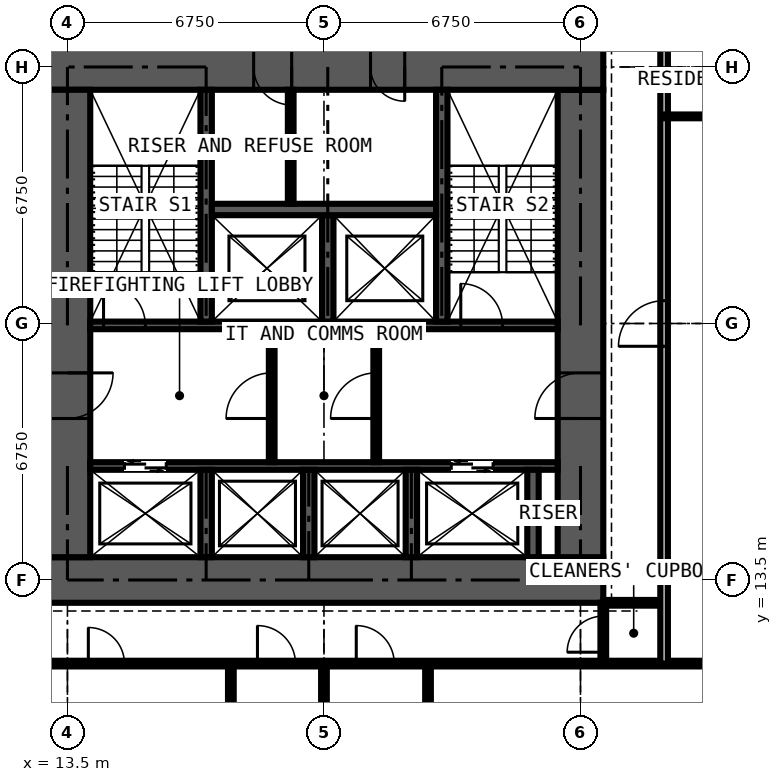
"""IFC4 building model, lengths in metres.
Left out: names, types, materials, properties, quantities, classifications, styles, units other than length and angle.
Written with IfcOpenShell. Run it as: python <this file> out.ifc"""

import sys

from ifc_helpers import new_model, si_unit, direction, frame, frame_2d, origin, place, context, subcontext, project, spatial, rectangle, extrude, element, fill, save


model = new_model("IFC4")
c1 = context("Model", 3, precision=1e-05, world=origin(), true_north=direction((0.0, 1.0)))
c2 = subcontext(c1, "Body", "Model", "MODEL_VIEW")
j1 = project(units=[si_unit("LENGTHUNIT", "METRE"), si_unit("PLANEANGLEUNIT", "RADIAN")], contexts=[c1])
p1 = place(None, origin())
s1 = spatial("IfcSite", under=j1, at=p1, CompositionType="ELEMENT")
p2 = place(p1, origin())
s2 = spatial("IfcBuilding", under=s1, at=p2, CompositionType="ELEMENT")
p3 = place(p2, frame((0.0, 0.0, 64.8)))
s3 = spatial("IfcBuildingStorey", under=s2, at=p3, CompositionType="ELEMENT", Elevation=64.8)
p4 = place(p3, frame((12.9, 13.5, 0.0), z_axis=(0.0, 0.0, 1.0), x_axis=(1.0, 0.0, 0.0)))
e1 = element("IfcWall", 1, at=p4, inside=s3, PredefinedType="SHEAR", context=c2, shape_type="SweptSolid", body=[
    extrude(rectangle(XDim=14.7, YDim=1.2, at=frame_2d((7.35, 0.0))), origin(), (0.0, 0.0, 1.0), 3.6),
])
p5 = place(p3, frame((27.0, 14.1, 0.0), z_axis=(0.0, 0.0, 1.0), x_axis=(0.0, 1.0, 0.0)))
e2 = element("IfcWall", 2, at=p5, inside=s3, PredefinedType="SHEAR", context=c2, shape_type="SweptSolid", body=[
    extrude(rectangle(XDim=12.3, YDim=1.2, at=frame_2d((6.15, 0.0))), origin(), (0.0, 0.0, 1.0), 3.6),
])
p6 = place(p5, frame((3.65, 0.0, 0.0)))
e3 = element("IfcOpeningElement", 3, at=p6, cuts=e2, PredefinedType="OPENING", context=c2, shape_type="SweptSolid", body=[
    extrude(rectangle(XDim=1.2, YDim=2.2, at=frame_2d((0.6, 1.1))), frame((0.0, 0.61, 0.0), z_axis=(0.0, -1.0, 0.0), x_axis=(1.0, 0.0, 0.0)), (0.0, 0.0, 1.0), 1.22),
])
p7 = place(p3, frame((27.6, 27.0, 0.0), z_axis=(0.0, 0.0, 1.0), x_axis=(-1.0, 0.0, 0.0)))
e4 = element("IfcWall", 4, at=p7, inside=s3, PredefinedType="SHEAR", context=c2, shape_type="SweptSolid", body=[
    extrude(rectangle(XDim=14.7, YDim=1.2, at=frame_2d((7.35, 0.0))), origin(), (0.0, 0.0, 1.0), 3.6),
])
p8 = place(p7, frame((5.225, 0.0, 0.0)))
e5 = element("IfcOpeningElement", 5, at=p8, cuts=e4, PredefinedType="OPENING", context=c2, shape_type="SweptSolid", body=[
    extrude(rectangle(XDim=0.9, YDim=2.2, at=frame_2d((0.45, 1.1))), frame((0.0, 0.61, 0.0), z_axis=(0.0, -1.0, 0.0), x_axis=(1.0, 0.0, 0.0)), (0.0, 0.0, 1.0), 1.22),
])
p9 = place(p7, frame((8.2, 0.0, 0.0)))
e6 = element("IfcOpeningElement", 6, at=p9, cuts=e4, PredefinedType="OPENING", context=c2, shape_type="SweptSolid", body=[
    extrude(rectangle(XDim=1.0, YDim=2.2, at=frame_2d((0.5, 1.1))), frame((0.0, 0.61, 0.0), z_axis=(0.0, -1.0, 0.0), x_axis=(1.0, 0.0, 0.0)), (0.0, 0.0, 1.0), 1.22),
])
p10 = place(p3, frame((13.5, 26.4, 0.0), z_axis=(0.0, 0.0, 1.0), x_axis=(0.0, -1.0, 0.0)))
e7 = element("IfcWall", 7, at=p10, inside=s3, PredefinedType="SHEAR", context=c2, shape_type="SweptSolid", body=[
    extrude(rectangle(XDim=12.3, YDim=1.2, at=frame_2d((6.15, 0.0))), origin(), (0.0, 0.0, 1.0), 3.6),
])
p11 = place(p10, frame((7.45, 0.0, 0.0)))
e8 = element("IfcOpeningElement", 8, at=p11, cuts=e7, PredefinedType="OPENING", context=c2, shape_type="SweptSolid", body=[
    extrude(rectangle(XDim=1.2, YDim=2.2, at=frame_2d((0.6, 1.1))), frame((0.0, 0.61, 0.0), z_axis=(0.0, -1.0, 0.0), x_axis=(1.0, 0.0, 0.0)), (0.0, 0.0, 1.0), 1.22),
])
p12 = place(p3, frame((14.1, 16.5, 0.0), z_axis=(0.0, 0.0, 1.0), x_axis=(1.0, 0.0, 0.0)))
e9 = element("IfcWall", 9, at=p12, inside=s3, PredefinedType="SHEAR", context=c2, shape_type="SweptSolid", body=[
    extrude(rectangle(XDim=12.3, YDim=0.2, at=frame_2d((6.15, 0.0))), origin(), (0.0, 0.0, 1.0), 3.6),
])
p13 = place(p12, frame((0.9, 0.0, 0.0)))
e10 = element("IfcOpeningElement", 10, at=p13, cuts=e9, PredefinedType="OPENING", context=c2, shape_type="SweptSolid", body=[
    extrude(rectangle(XDim=1.1, YDim=2.2, at=frame_2d((0.55, 1.1))), frame((0.0, 0.11, 0.0), z_axis=(0.0, -1.0, 0.0), x_axis=(1.0, 0.0, 0.0)), (0.0, 0.0, 1.0), 0.22),
])
p14 = place(p12, frame((9.5, 0.0, 0.0)))
e11 = element("IfcOpeningElement", 11, at=p14, cuts=e9, PredefinedType="OPENING", context=c2, shape_type="SweptSolid", body=[
    extrude(rectangle(XDim=1.1, YDim=2.2, at=frame_2d((0.55, 1.1))), frame((0.0, 0.11, 0.0), z_axis=(0.0, -1.0, 0.0), x_axis=(1.0, 0.0, 0.0)), (0.0, 0.0, 1.0), 0.22),
])
p15 = place(p3, frame((14.1, 20.2, 0.0), z_axis=(0.0, 0.0, 1.0), x_axis=(1.0, 0.0, 0.0)))
e12 = element("IfcWall", 12, at=p15, inside=s3, PredefinedType="SHEAR", context=c2, shape_type="SweptSolid", body=[
    extrude(rectangle(XDim=12.3, YDim=0.2, at=frame_2d((6.15, 0.0))), origin(), (0.0, 0.0, 1.0), 3.6),
])
p16 = place(p15, frame((0.35, 0.0, 0.0)))
e13 = element("IfcOpeningElement", 13, at=p16, cuts=e12, PredefinedType="OPENING", context=c2, shape_type="SweptSolid", body=[
    extrude(rectangle(XDim=1.1, YDim=2.2, at=frame_2d((0.55, 1.1))), frame((0.0, 0.11, 0.0), z_axis=(0.0, -1.0, 0.0), x_axis=(1.0, 0.0, 0.0)), (0.0, 0.0, 1.0), 0.22),
])
p17 = place(p15, frame((9.75, 0.0, 0.0)))
e14 = element("IfcOpeningElement", 14, at=p17, cuts=e12, PredefinedType="OPENING", context=c2, shape_type="SweptSolid", body=[
    extrude(rectangle(XDim=1.1, YDim=2.2, at=frame_2d((0.55, 1.1))), frame((0.0, 0.11, 0.0), z_axis=(0.0, -1.0, 0.0), x_axis=(1.0, 0.0, 0.0)), (0.0, 0.0, 1.0), 0.22),
])
for number, where, z_axis, x_axis in (
    (15, (17.15, 20.3, 0.0), (0.0, 0.0, 1.0), (0.0, 1.0, 0.0)),
    (16, (23.35, 20.3, 0.0), (0.0, 0.0, 1.0), (0.0, 1.0, 0.0)),
):
    element("IfcWall", number, at=place(p3, frame(where, z_axis=z_axis, x_axis=x_axis)), inside=s3, PredefinedType="SHEAR", context=c2, shape_type="SweptSolid", body=[
        extrude(rectangle(XDim=6.1, YDim=0.3, at=frame_2d((3.05, 0.0))), origin(), (0.0, 0.0, 1.0), 3.6),
    ])
p18 = place(p3, frame((20.35, 20.3, 0.0), z_axis=(0.0, 0.0, 1.0), x_axis=(0.0, 1.0, 0.0)))
e17 = element("IfcWall", 17, at=p18, inside=s3, PredefinedType="SHEAR", context=c2, shape_type="SweptSolid", body=[
    extrude(rectangle(XDim=2.8, YDim=0.3, at=frame_2d((1.4, 0.0))), origin(), (0.0, 0.0, 1.0), 3.6),
])
p19 = place(p3, frame((17.3, 23.25, 0.0), z_axis=(0.0, 0.0, 1.0), x_axis=(1.0, 0.0, 0.0)))
e18 = element("IfcWall", 18, at=p19, inside=s3, PredefinedType="SHEAR", context=c2, shape_type="SweptSolid", body=[
    extrude(rectangle(XDim=5.9, YDim=0.3, at=frame_2d((2.95, 0.0))), origin(), (0.0, 0.0, 1.0), 3.6),
])
for number, where, z_axis, x_axis in (
    (19, (17.15, 14.1, 0.0), (0.0, 0.0, 1.0), (0.0, 1.0, 0.0)),
    (20, (19.85, 14.1, 0.0), (0.0, 0.0, 1.0), (0.0, 1.0, 0.0)),
    (21, (22.55, 14.1, 0.0), (0.0, 0.0, 1.0), (0.0, 1.0, 0.0)),
    (22, (25.75, 14.1, 0.0), (0.0, 0.0, 1.0), (0.0, 1.0, 0.0)),
):
    element("IfcWall", number, at=place(p3, frame(where, z_axis=z_axis, x_axis=x_axis)), inside=s3, PredefinedType="SHEAR", context=c2, shape_type="SweptSolid", body=[
        extrude(rectangle(XDim=2.3, YDim=0.3, at=frame_2d((1.15, 0.0))), origin(), (0.0, 0.0, 1.0), 3.6),
    ])
p20 = place(p3, frame((18.875, 16.6, 0.0), z_axis=(0.0, 0.0, 1.0), x_axis=(0.0, 1.0, 0.0)))
e23 = element("IfcWall", 23, at=p20, inside=s3, PredefinedType="PARTITIONING", context=c2, shape_type="SweptSolid", body=[
    extrude(rectangle(XDim=3.5, YDim=0.15, at=frame_2d((1.75, 0.0))), origin(), (0.0, 0.0, 1.0), 3.375),
])
p21 = place(p20, frame((1.15, 0.0, 0.0)))
e24 = element("IfcOpeningElement", 24, at=p21, cuts=e23, PredefinedType="OPENING", context=c2, shape_type="SweptSolid", body=[
    extrude(rectangle(XDim=1.2, YDim=2.2, at=frame_2d((0.6, 1.1))), frame((0.0, 0.085, 0.0), z_axis=(0.0, -1.0, 0.0), x_axis=(1.0, 0.0, 0.0)), (0.0, 0.0, 1.0), 0.17),
])
p22 = place(p3, frame((21.625, 16.6, 0.0), z_axis=(0.0, 0.0, 1.0), x_axis=(0.0, 1.0, 0.0)))
e25 = element("IfcWall", 25, at=p22, inside=s3, PredefinedType="PARTITIONING", context=c2, shape_type="SweptSolid", body=[
    extrude(rectangle(XDim=3.5, YDim=0.15, at=frame_2d((1.75, 0.0))), origin(), (0.0, 0.0, 1.0), 3.375),
])
p23 = place(p22, frame((1.15, 0.0, 0.0)))
e26 = element("IfcOpeningElement", 26, at=p23, cuts=e25, PredefinedType="OPENING", context=c2, shape_type="SweptSolid", body=[
    extrude(rectangle(XDim=1.2, YDim=2.2, at=frame_2d((0.6, 1.1))), frame((0.0, 0.085, 0.0), z_axis=(0.0, -1.0, 0.0), x_axis=(1.0, 0.0, 0.0)), (0.0, 0.0, 1.0), 0.17),
])
p24 = place(p3, frame((19.375, 23.4, 0.0), z_axis=(0.0, 0.0, 1.0), x_axis=(0.0, 1.0, 0.0)))
e27 = element("IfcWall", 27, at=p24, inside=s3, PredefinedType="PARTITIONING", context=c2, shape_type="SweptSolid", body=[
    extrude(rectangle(XDim=3.0, YDim=0.15, at=frame_2d((1.5, 0.0))), origin(), (0.0, 0.0, 1.0), 3.375),
])
p25 = place(p3, frame((10.125, 11.3, 0.0), z_axis=(0.0, 0.0, 1.0), x_axis=(1.0, 0.0, 0.0)))
e28 = element("IfcWall", 28, at=p25, inside=s3, PredefinedType="PARTITIONING", context=c2, shape_type="SweptSolid", body=[
    extrude(rectangle(XDim=20.675, YDim=0.15, at=frame_2d((10.337, 0.0))), origin(), (0.0, 0.0, 1.0), 3.375),
])
p26 = place(p25, frame((8.375, 0.0, 0.0)))
e29 = element("IfcOpeningElement", 29, at=p26, cuts=e28, PredefinedType="OPENING", context=c2, shape_type="SweptSolid", body=[
    extrude(rectangle(XDim=1.0, YDim=2.2, at=frame_2d((0.5, 1.1))), frame((0.0, 0.085, 0.0), z_axis=(0.0, -1.0, 0.0), x_axis=(1.0, 0.0, 0.0)), (0.0, 0.0, 1.0), 0.17),
])
p27 = place(p25, frame((10.975, 0.0, 0.0)))
e30 = element("IfcOpeningElement", 30, at=p27, cuts=e28, PredefinedType="OPENING", context=c2, shape_type="SweptSolid", body=[
    extrude(rectangle(XDim=1.0, YDim=2.2, at=frame_2d((0.5, 1.1))), frame((0.0, 0.085, 0.0), z_axis=(0.0, -1.0, 0.0), x_axis=(1.0, 0.0, 0.0)), (0.0, 0.0, 1.0), 0.17),
])
p28 = place(p25, frame((3.925, 0.0, 0.0)))
e31 = element("IfcOpeningElement", 31, at=p28, cuts=e28, PredefinedType="OPENING", context=c2, shape_type="SweptSolid", body=[
    extrude(rectangle(XDim=0.95, YDim=2.2, at=frame_2d((0.475, 1.1))), frame((0.0, 0.085, 0.0), z_axis=(0.0, -1.0, 0.0), x_axis=(1.0, 0.0, 0.0)), (0.0, 0.0, 1.0), 0.17),
])
p29 = place(p3, frame((17.8, 5.65, 0.0), z_axis=(0.0, 0.0, 1.0), x_axis=(0.0, 1.0, 0.0)))
e32 = element("IfcWall", 32, at=p29, inside=s3, PredefinedType="PARTITIONING", context=c2, shape_type="SweptSolid", body=[
    extrude(rectangle(XDim=5.65, YDim=0.15, at=frame_2d((2.825, 0.0))), origin(), (0.0, 0.0, 1.0), 3.375),
])
p30 = place(p3, frame((20.25, -0.734, 0.0), z_axis=(0.0, 0.0, 1.0), x_axis=(0.0, 1.0, 0.0)))
e33 = element("IfcWall", 33, at=p30, inside=s3, PredefinedType="PARTITIONING", context=c2, shape_type="SweptSolid", body=[
    extrude(rectangle(XDim=12.034, YDim=0.15, at=frame_2d((6.017, 0.0))), origin(), (0.0, 0.0, 1.0), 2.61),
])
p31 = place(p3, frame((22.988, 5.65, 0.0), z_axis=(0.0, 0.0, 1.0), x_axis=(0.0, 1.0, 0.0)))
e34 = element("IfcWall", 34, at=p31, inside=s3, PredefinedType="PARTITIONING", context=c2, shape_type="SweptSolid", body=[
    extrude(rectangle(XDim=5.65, YDim=0.15, at=frame_2d((2.825, 0.0))), origin(), (0.0, 0.0, 1.0), 3.375),
])
p32 = place(p3, frame((27.6, 11.3, 0.0), z_axis=(0.0, 0.0, 1.0), x_axis=(0.0, 1.0, 0.0)))
e35 = element("IfcWall", 35, at=p32, inside=s3, PredefinedType="PARTITIONING", context=c2, shape_type="SweptSolid", body=[
    extrude(rectangle(XDim=1.6, YDim=0.15, at=frame_2d((0.8, 0.0))), origin(), (0.0, 0.0, 1.0), 3.375),
])
p33 = place(p32, frame((0.3, 0.0, 0.0)))
e36 = element("IfcOpeningElement", 36, at=p33, cuts=e35, PredefinedType="OPENING", context=c2, shape_type="SweptSolid", body=[
    extrude(rectangle(XDim=0.95, YDim=2.2, at=frame_2d((0.475, 1.1))), frame((0.0, 0.085, 0.0), z_axis=(0.0, -1.0, 0.0), x_axis=(1.0, 0.0, 0.0)), (0.0, 0.0, 1.0), 0.17),
])
p34 = place(p3, frame((27.6, 12.9, 0.0), z_axis=(0.0, 0.0, 1.0), x_axis=(1.0, 0.0, 0.0)))
e37 = element("IfcWall", 37, at=p34, inside=s3, PredefinedType="PARTITIONING", context=c2, shape_type="SweptSolid", body=[
    extrude(rectangle(XDim=1.6, YDim=0.15, at=frame_2d((0.8, 0.0))), origin(), (0.0, 0.0, 1.0), 2.877),
])
p35 = place(p3, frame((29.2, 11.3, 0.0), z_axis=(0.0, 0.0, 1.0), x_axis=(0.0, 1.0, 0.0)))
e38 = element("IfcWall", 38, at=p35, inside=s3, PredefinedType="PARTITIONING", context=c2, shape_type="SweptSolid", body=[
    extrude(rectangle(XDim=17.9, YDim=0.2, at=frame_2d((8.95, 0.0))), origin(), (0.0, 0.0, 1.0), 3.375),
])
p36 = place(p35, frame((8.35, 0.0, 0.0)))
e39 = element("IfcOpeningElement", 39, at=p36, cuts=e38, PredefinedType="OPENING", context=c2, shape_type="SweptSolid", body=[
    extrude(rectangle(XDim=1.2, YDim=2.2, at=frame_2d((0.6, 1.1))), frame((0.0, 0.11, 0.0), z_axis=(0.0, -1.0, 0.0), x_axis=(1.0, 0.0, 0.0)), (0.0, 0.0, 1.0), 0.22),
])
p37 = place(p3, frame((29.2, 25.7, 0.0), z_axis=(0.0, 0.0, 1.0), x_axis=(1.0, 0.0, 0.0)))
e40 = element("IfcWall", 40, at=p37, inside=s3, PredefinedType="SHEAR", context=c2, shape_type="SweptSolid", body=[
    extrude(rectangle(XDim=3.45, YDim=0.1, at=frame_2d((1.725, 0.0))), origin(), (0.0, 0.0, 1.0), 3.375),
])
p38 = place(p13, origin())
e41 = element("IfcDoor", 41, at=p38, inside=s3, OperationType="DOUBLE_DOOR_SLIDING", PredefinedType="DOOR", context=c2, shape_type="SweptSolid", body=[
    extrude(rectangle(XDim=1.1, YDim=2.2, at=frame_2d((0.55, 1.1))), frame((0.0, 0.025, 0.0), z_axis=(0.0, -1.0, 0.0), x_axis=(1.0, 0.0, 0.0)), (0.0, 0.0, 1.0), 0.05),
])
fill(e10, e41)
p39 = place(p14, origin())
e42 = element("IfcDoor", 42, at=p39, inside=s3, OperationType="DOUBLE_DOOR_SLIDING", PredefinedType="DOOR", context=c2, shape_type="SweptSolid", body=[
    extrude(rectangle(XDim=1.1, YDim=2.2, at=frame_2d((0.55, 1.1))), frame((0.0, 0.025, 0.0), z_axis=(0.0, -1.0, 0.0), x_axis=(1.0, 0.0, 0.0)), (0.0, 0.0, 1.0), 0.05),
])
fill(e11, e42)
p40 = place(p11, origin())
e43 = element("IfcDoor", 43, at=p40, inside=s3, OperationType="DOUBLE_DOOR_SINGLE_SWING", PredefinedType="DOOR", context=c2, shape_type="SweptSolid", body=[
    extrude(rectangle(XDim=1.2, YDim=2.2, at=frame_2d((0.6, 1.1))), frame((0.0, 0.025, 0.0), z_axis=(0.0, -1.0, 0.0), x_axis=(1.0, 0.0, 0.0)), (0.0, 0.0, 1.0), 0.05),
])
fill(e8, e43)
p41 = place(p6, origin())
e44 = element("IfcDoor", 44, at=p41, inside=s3, OperationType="DOUBLE_DOOR_SINGLE_SWING", PredefinedType="DOOR", context=c2, shape_type="SweptSolid", body=[
    extrude(rectangle(XDim=1.2, YDim=2.2, at=frame_2d((0.6, 1.1))), frame((0.0, 0.025, 0.0), z_axis=(0.0, -1.0, 0.0), x_axis=(1.0, 0.0, 0.0)), (0.0, 0.0, 1.0), 0.05),
])
fill(e3, e44)
p42 = place(p21, origin())
e45 = element("IfcDoor", 45, at=p42, inside=s3, OperationType="DOUBLE_DOOR_SINGLE_SWING", PredefinedType="DOOR", context=c2, shape_type="SweptSolid", body=[
    extrude(rectangle(XDim=1.2, YDim=2.2, at=frame_2d((0.6, 1.1))), frame((0.0, 0.025, 0.0), z_axis=(0.0, -1.0, 0.0), x_axis=(1.0, 0.0, 0.0)), (0.0, 0.0, 1.0), 0.05),
])
fill(e24, e45)
p43 = place(p23, origin())
e46 = element("IfcDoor", 46, at=p43, inside=s3, OperationType="DOUBLE_DOOR_SINGLE_SWING", PredefinedType="DOOR", context=c2, shape_type="SweptSolid", body=[
    extrude(rectangle(XDim=1.2, YDim=2.2, at=frame_2d((0.6, 1.1))), frame((0.0, 0.025, 0.0), z_axis=(0.0, -1.0, 0.0), x_axis=(1.0, 0.0, 0.0)), (0.0, 0.0, 1.0), 0.05),
])
fill(e26, e46)
p44 = place(p8, origin())
e47 = element("IfcDoor", 47, at=p44, inside=s3, OperationType="SINGLE_SWING_LEFT", PredefinedType="DOOR", context=c2, shape_type="SweptSolid", body=[
    extrude(rectangle(XDim=0.9, YDim=2.2, at=frame_2d((0.45, 1.1))), frame((0.0, 0.4, 0.0), z_axis=(0.0, -1.0, 0.0), x_axis=(1.0, 0.0, 0.0)), (0.0, 0.0, 1.0), 0.8),
])
fill(e5, e47)
p45 = place(p9, origin())
e48 = element("IfcDoor", 48, at=p45, inside=s3, OperationType="SINGLE_SWING_LEFT", PredefinedType="DOOR", context=c2, shape_type="SweptSolid", body=[
    extrude(rectangle(XDim=1.0, YDim=2.2, at=frame_2d((0.5, 1.1))), frame((0.0, 0.025, 0.0), z_axis=(0.0, -1.0, 0.0), x_axis=(1.0, 0.0, 0.0)), (0.0, 0.0, 1.0), 0.05),
])
fill(e6, e48)
p46 = place(p16, origin())
e49 = element("IfcDoor", 49, at=p46, inside=s3, OperationType="SINGLE_SWING_LEFT", PredefinedType="DOOR", context=c2, shape_type="SweptSolid", body=[
    extrude(rectangle(XDim=1.1, YDim=2.2, at=frame_2d((0.55, 1.1))), frame((0.0, 0.025, 0.0), z_axis=(0.0, -1.0, 0.0), x_axis=(1.0, 0.0, 0.0)), (0.0, 0.0, 1.0), 0.05),
])
fill(e13, e49)
p47 = place(p17, origin())
e50 = element("IfcDoor", 50, at=p47, inside=s3, OperationType="SINGLE_SWING_LEFT", PredefinedType="DOOR", context=c2, shape_type="SweptSolid", body=[
    extrude(rectangle(XDim=1.1, YDim=2.2, at=frame_2d((0.55, 1.1))), frame((0.0, 0.025, 0.0), z_axis=(0.0, -1.0, 0.0), x_axis=(1.0, 0.0, 0.0)), (0.0, 0.0, 1.0), 0.05),
])
fill(e14, e50)
p48 = place(p33, origin())
e51 = element("IfcDoor", 51, at=p48, inside=s3, OperationType="SINGLE_SWING_LEFT", PredefinedType="DOOR", context=c2, shape_type="SweptSolid", body=[
    extrude(rectangle(XDim=0.95, YDim=2.2, at=frame_2d((0.475, 1.1))), frame((0.0, 0.025, 0.0), z_axis=(0.0, -1.0, 0.0), x_axis=(1.0, 0.0, 0.0)), (0.0, 0.0, 1.0), 0.05),
])
fill(e36, e51)
p49 = place(p26, origin())
e52 = element("IfcDoor", 52, at=p49, inside=s3, OperationType="SINGLE_SWING_LEFT", PredefinedType="DOOR", context=c2, shape_type="SweptSolid", body=[
    extrude(rectangle(XDim=1.0, YDim=2.2, at=frame_2d((0.5, 1.1))), frame((0.0, 0.025, 0.0), z_axis=(0.0, -1.0, 0.0), x_axis=(1.0, 0.0, 0.0)), (0.0, 0.0, 1.0), 0.05),
])
fill(e29, e52)
p50 = place(p27, origin())
e53 = element("IfcDoor", 53, at=p50, inside=s3, OperationType="SINGLE_SWING_LEFT", PredefinedType="DOOR", context=c2, shape_type="SweptSolid", body=[
    extrude(rectangle(XDim=1.0, YDim=2.2, at=frame_2d((0.5, 1.1))), frame((0.0, 0.025, 0.0), z_axis=(0.0, -1.0, 0.0), x_axis=(1.0, 0.0, 0.0)), (0.0, 0.0, 1.0), 0.05),
])
fill(e30, e53)
p51 = place(p28, origin())
e54 = element("IfcDoor", 54, at=p51, inside=s3, OperationType="SINGLE_SWING_LEFT", PredefinedType="DOOR", context=c2, shape_type="SweptSolid", body=[
    extrude(rectangle(XDim=0.95, YDim=2.2, at=frame_2d((0.475, 1.1))), frame((0.0, 0.025, 0.0), z_axis=(0.0, -1.0, 0.0), x_axis=(1.0, 0.0, 0.0)), (0.0, 0.0, 1.0), 0.05),
])
fill(e31, e54)
p52 = place(p36, origin())
e55 = element("IfcDoor", 55, at=p52, inside=s3, OperationType="DOUBLE_DOOR_SINGLE_SWING", PredefinedType="DOOR", context=c2, shape_type="SweptSolid", body=[
    extrude(rectangle(XDim=1.2, YDim=2.2, at=frame_2d((0.6, 1.1))), frame((0.0, 0.025, 0.0), z_axis=(0.0, -1.0, 0.0), x_axis=(1.0, 0.0, 0.0)), (0.0, 0.0, 1.0), 0.05),
])
fill(e39, e55)
save(model, sys.argv[1])
